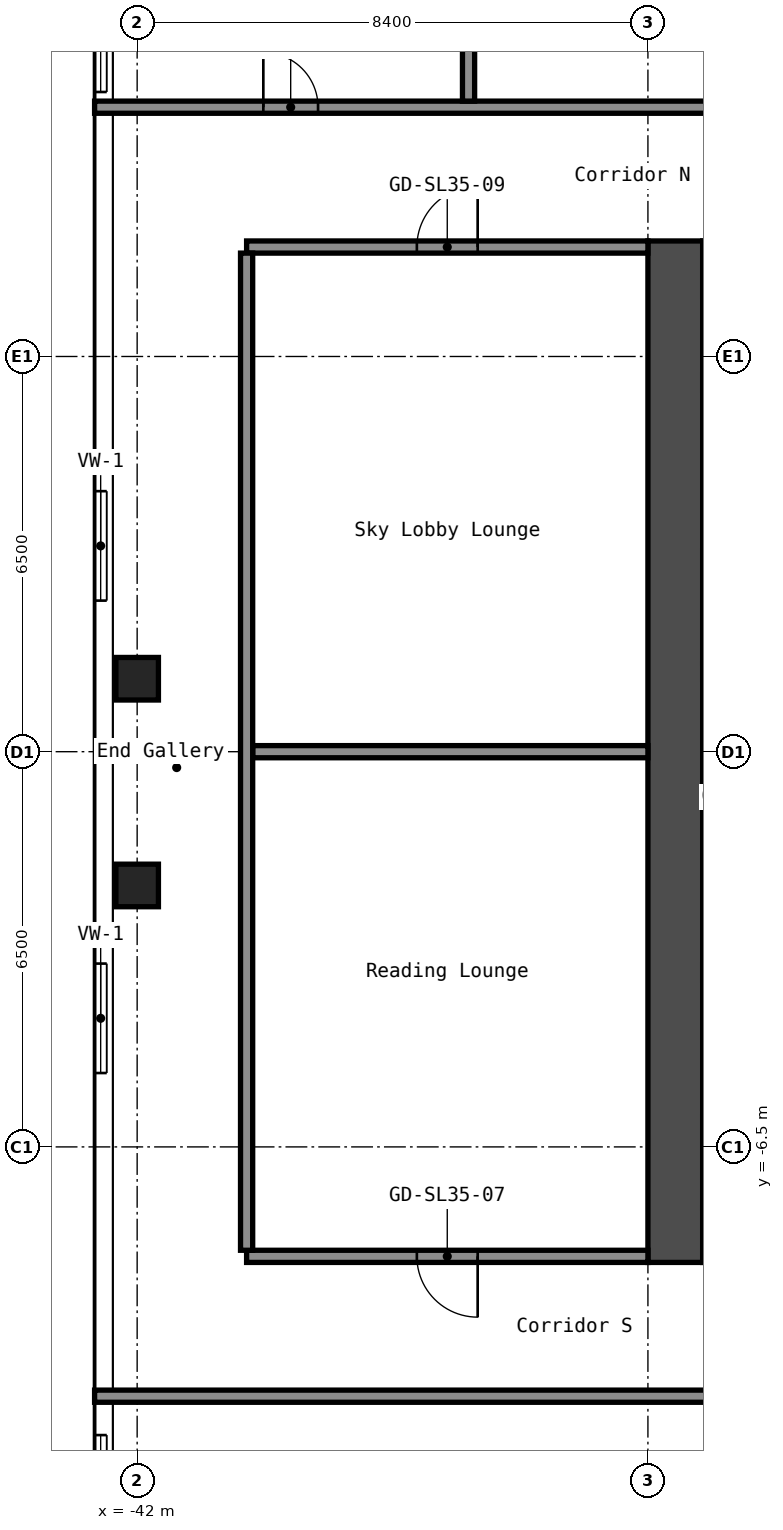
"""IFC4 building model, lengths in metres.
Left out: names, types, materials, properties, quantities, classifications, styles, units other than length and angle.
Written with IfcOpenShell. Run it as: python <this file> out.ifc"""

import sys

from ifc_helpers import new_model, si_unit, direction, frame, frame_2d, origin, origin_2d, place, context, subcontext, project, spatial, rectangle, hollow_rectangle, extrude, element, fill, save


model = new_model("IFC4")
c1 = context("Model", 3, precision=1e-05, world=origin(), true_north=direction((0.0, 1.0)))
c2 = subcontext(c1, "Body", "Model", "MODEL_VIEW")
j1 = project(units=[si_unit("LENGTHUNIT", "METRE"), si_unit("PLANEANGLEUNIT", "RADIAN")], contexts=[c1])
p1 = place(None, origin())
s1 = spatial("IfcSite", under=j1, at=p1, CompositionType="ELEMENT")
p2 = place(p1, origin())
s2 = spatial("IfcBuilding", under=s1, at=p2, CompositionType="ELEMENT")
p3 = place(p2, frame((0.0, 0.0, 124.6)))
s3 = spatial("IfcBuildingStorey", under=s2, at=p3, CompositionType="ELEMENT", Elevation=124.6)
for number, where, z_axis, x_axis in (
    (1, (-42.0, -2.2, 0.0), (0.0, 0.0, 1.0), (1.0, 0.0, 0.0)),
    (2, (-42.0, 1.2, 0.0), (0.0, 0.0, 1.0), (1.0, 0.0, 0.0)),
):
    element("IfcColumn", number, at=place(p3, frame(where, z_axis=z_axis, x_axis=x_axis)), inside=s3, PredefinedType="COLUMN", context=c2, shape_type="SweptSolid", body=[
        extrude(hollow_rectangle(XDim=0.7, YDim=0.7, WallThickness=0.028, at=origin_2d()), origin(), (0.0, 0.0, 1.0), 5.95),
    ])
p4 = place(p3, frame((-33.15, -8.4, 0.0), z_axis=(0.0, 0.0, 1.0), x_axis=(0.0, 1.0, 0.0)))
e3 = element("IfcWall", 3, at=p4, inside=s3, PredefinedType="SHEAR", context=c2, shape_type="SweptSolid", body=[
    extrude(rectangle(XDim=16.8, YDim=0.9, at=frame_2d((8.4, 0.0))), origin(), (0.0, 0.0, 1.0), 5.95),
])
p5 = place(p3, frame((-32.7, 1.325, 0.0), z_axis=(0.0, 0.0, 1.0), x_axis=(1.0, 0.0, 0.0)))
e4 = element("IfcWall", 4, at=p5, inside=s3, PredefinedType="SHEAR", context=c2, shape_type="SweptSolid", body=[
    extrude(rectangle(XDim=5.05, YDim=0.25, at=frame_2d((2.525, 0.0))), origin(), (0.0, 0.0, 1.0), 5.95),
])
p6 = place(p5, frame((3.3, 0.0, 0.0)))
e5 = element("IfcOpeningElement", 5, at=p6, cuts=e4, PredefinedType="OPENING", context=c2, shape_type="SweptSolid", body=[
    extrude(rectangle(XDim=1.2, YDim=2.1, at=frame_2d((0.6, 1.05))), frame((0.0, 0.135, 0.0), z_axis=(0.0, -1.0, 0.0), x_axis=(1.0, 0.0, 0.0)), (0.0, 0.0, 1.0), 0.27),
])
p7 = place(p3, frame((-32.7, -3.625, 0.0), z_axis=(0.0, 0.0, 1.0), x_axis=(1.0, 0.0, 0.0)))
e6 = element("IfcWall", 6, at=p7, inside=s3, PredefinedType="SHEAR", context=c2, shape_type="SweptSolid", body=[
    extrude(rectangle(XDim=4.55, YDim=0.25, at=frame_2d((2.275, 0.0))), origin(), (0.0, 0.0, 1.0), 5.95),
])
p8 = place(p7, frame((2.85, 0.0, 0.0)))
e7 = element("IfcOpeningElement", 7, at=p8, cuts=e6, PredefinedType="OPENING", context=c2, shape_type="SweptSolid", body=[
    extrude(rectangle(XDim=1.1, YDim=2.1, at=frame_2d((0.55, 1.05))), frame((0.0, 0.135, 0.0), z_axis=(0.0, -1.0, 0.0), x_axis=(1.0, 0.0, 0.0)), (0.0, 0.0, 1.0), 0.27),
])
p9 = place(p7, frame((0.6, 0.0, 0.0)))
e8 = element("IfcOpeningElement", 8, at=p9, cuts=e6, PredefinedType="OPENING", context=c2, shape_type="SweptSolid", body=[
    extrude(rectangle(XDim=1.1, YDim=2.1, at=frame_2d((0.55, 1.05))), frame((0.0, 0.135, 0.0), z_axis=(0.0, -1.0, 0.0), x_axis=(1.0, 0.0, 0.0)), (0.0, 0.0, 1.0), 0.27),
])
p10 = place(p3, frame((-32.7, -6.75, 0.0), z_axis=(0.0, 0.0, 1.0), x_axis=(1.0, 0.0, 0.0)))
e9 = element("IfcWall", 9, at=p10, inside=s3, PredefinedType="SHEAR", context=c2, shape_type="SweptSolid", body=[
    extrude(rectangle(XDim=4.55, YDim=1.5, at=frame_2d((2.275, 0.0))), origin(), (0.0, 0.0, 1.0), 5.95),
])
p11 = place(p3, frame((-42.7, -10.6, 0.0), z_axis=(0.0, 0.0, 1.0), x_axis=(1.0, 0.0, 0.0)))
e10 = element("IfcWall", 10, at=p11, inside=s3, PredefinedType="PARTITIONING", context=c2, shape_type="SweptSolid", body=[
    extrude(rectangle(XDim=25.9, YDim=0.2, at=frame_2d((12.95, 0.0))), origin(), (0.0, 0.0, 1.0), 5.95),
])
p12 = place(p11, frame((10.2, 0.0, 0.0)))
e11 = element("IfcOpeningElement", 11, at=p12, cuts=e10, PredefinedType="OPENING", context=c2, shape_type="SweptSolid", body=[
    extrude(rectangle(XDim=1.6, YDim=2.1, at=frame_2d((0.8, 1.05))), frame((0.0, 0.11, 0.0), z_axis=(0.0, -1.0, 0.0), x_axis=(1.0, 0.0, 0.0)), (0.0, 0.0, 1.0), 0.22),
])
p13 = place(p11, frame((20.9, 0.0, 0.0)))
e12 = element("IfcOpeningElement", 12, at=p13, cuts=e10, PredefinedType="OPENING", context=c2, shape_type="SweptSolid", body=[
    extrude(rectangle(XDim=1.6, YDim=2.1, at=frame_2d((0.8, 1.05))), frame((0.0, 0.11, 0.0), z_axis=(0.0, -1.0, 0.0), x_axis=(1.0, 0.0, 0.0)), (0.0, 0.0, 1.0), 0.22),
])
p14 = place(p3, frame((-40.2, -8.3, 0.0), z_axis=(0.0, 0.0, 1.0), x_axis=(1.0, 0.0, 0.0)))
e13 = element("IfcWall", 13, at=p14, inside=s3, PredefinedType="PARTITIONING", context=c2, shape_type="SweptSolid", body=[
    extrude(rectangle(XDim=6.6, YDim=0.2, at=frame_2d((3.3, 0.0))), origin(), (0.0, 0.0, 1.0), 5.95),
])
p15 = place(p14, frame((2.8, 0.0, 0.0)))
e14 = element("IfcOpeningElement", 14, at=p15, cuts=e13, PredefinedType="OPENING", context=c2, shape_type="SweptSolid", body=[
    extrude(rectangle(XDim=1.0, YDim=2.1, at=frame_2d((0.5, 1.05))), frame((0.0, 0.11, 0.0), z_axis=(0.0, -1.0, 0.0), x_axis=(1.0, 0.0, 0.0)), (0.0, 0.0, 1.0), 0.22),
])
p16 = place(p3, frame((-40.1, 0.0, 0.0), z_axis=(0.0, 0.0, 1.0), x_axis=(1.0, 0.0, 0.0)))
e15 = element("IfcWall", 15, at=p16, inside=s3, PredefinedType="PARTITIONING", context=c2, shape_type="SweptSolid", body=[
    extrude(rectangle(XDim=6.5, YDim=0.2, at=frame_2d((3.25, 0.0))), origin(), (0.0, 0.0, 1.0), 5.95),
])
p17 = place(p3, frame((-40.2, 8.3, 0.0), z_axis=(0.0, 0.0, 1.0), x_axis=(1.0, 0.0, 0.0)))
e16 = element("IfcWall", 16, at=p17, inside=s3, PredefinedType="PARTITIONING", context=c2, shape_type="SweptSolid", body=[
    extrude(rectangle(XDim=6.6, YDim=0.2, at=frame_2d((3.3, 0.0))), origin(), (0.0, 0.0, 1.0), 5.95),
])
p18 = place(p17, frame((2.8, 0.0, 0.0)))
e17 = element("IfcOpeningElement", 17, at=p18, cuts=e16, PredefinedType="OPENING", context=c2, shape_type="SweptSolid", body=[
    extrude(rectangle(XDim=1.0, YDim=2.1, at=frame_2d((0.5, 1.05))), frame((0.0, 0.11, 0.0), z_axis=(0.0, -1.0, 0.0), x_axis=(1.0, 0.0, 0.0)), (0.0, 0.0, 1.0), 0.22),
])
p19 = place(p3, frame((-42.7, 10.6, 0.0), z_axis=(0.0, 0.0, 1.0), x_axis=(1.0, 0.0, 0.0)))
e18 = element("IfcWall", 18, at=p19, inside=s3, PredefinedType="PARTITIONING", context=c2, shape_type="SweptSolid", body=[
    extrude(rectangle(XDim=25.9, YDim=0.2, at=frame_2d((12.95, 0.0))), origin(), (0.0, 0.0, 1.0), 5.95),
])
p20 = place(p19, frame((2.775, 0.0, 0.0)))
e19 = element("IfcOpeningElement", 19, at=p20, cuts=e18, PredefinedType="OPENING", context=c2, shape_type="SweptSolid", body=[
    extrude(rectangle(XDim=0.9, YDim=2.1, at=frame_2d((0.45, 1.05))), frame((0.0, 0.11, 0.0), z_axis=(0.0, -1.0, 0.0), x_axis=(1.0, 0.0, 0.0)), (0.0, 0.0, 1.0), 0.22),
])
p21 = place(p19, frame((10.725, 0.0, 0.0)))
e20 = element("IfcOpeningElement", 20, at=p21, cuts=e18, PredefinedType="OPENING", context=c2, shape_type="SweptSolid", body=[
    extrude(rectangle(XDim=0.9, YDim=2.1, at=frame_2d((0.45, 1.05))), frame((0.0, 0.11, 0.0), z_axis=(0.0, -1.0, 0.0), x_axis=(1.0, 0.0, 0.0)), (0.0, 0.0, 1.0), 0.22),
])
p22 = place(p19, frame((14.3, 0.0, 0.0)))
e21 = element("IfcOpeningElement", 21, at=p22, cuts=e18, PredefinedType="OPENING", context=c2, shape_type="SweptSolid", body=[
    extrude(rectangle(XDim=0.9, YDim=2.1, at=frame_2d((0.45, 1.05))), frame((0.0, 0.11, 0.0), z_axis=(0.0, -1.0, 0.0), x_axis=(1.0, 0.0, 0.0)), (0.0, 0.0, 1.0), 0.22),
])
p23 = place(p19, frame((20.9, 0.0, 0.0)))
e22 = element("IfcOpeningElement", 22, at=p23, cuts=e18, PredefinedType="OPENING", context=c2, shape_type="SweptSolid", body=[
    extrude(rectangle(XDim=1.6, YDim=2.1, at=frame_2d((0.8, 1.05))), frame((0.0, 0.11, 0.0), z_axis=(0.0, -1.0, 0.0), x_axis=(1.0, 0.0, 0.0)), (0.0, 0.0, 1.0), 0.22),
])
p24 = place(p3, frame((-40.2, -8.2, 0.0), z_axis=(0.0, 0.0, 1.0), x_axis=(0.0, 1.0, 0.0)))
e23 = element("IfcWall", 23, at=p24, inside=s3, PredefinedType="PARTITIONING", context=c2, shape_type="SweptSolid", body=[
    extrude(rectangle(XDim=16.4, YDim=0.2, at=frame_2d((8.2, 0.0))), origin(), (0.0, 0.0, 1.0), 5.95),
])
p25 = place(p3, frame((-36.55, 10.7, 0.0), z_axis=(0.0, 0.0, 1.0), x_axis=(0.0, 1.0, 0.0)))
e24 = element("IfcWall", 24, at=p25, inside=s3, PredefinedType="PARTITIONING", context=c2, shape_type="SweptSolid", body=[
    extrude(rectangle(XDim=7.6, YDim=0.2, at=frame_2d((3.8, 0.0))), origin(), (0.0, 0.0, 1.0), 5.95),
])
p26 = place(p3, frame((-42.6, 15.01, 4.45), z_axis=(0.0, 0.0, 1.0), x_axis=(0.0, -1.0, 0.0)))
p27 = place(p26, frame((2.359, 0.0, 0.25)))
p28 = place(p27, origin())
e25 = element("IfcWindow", 25, at=p28, inside=s3, PartitioningType="SINGLE_PANEL", PredefinedType="WINDOW", context=c2, shape_type="SweptSolid", body=[
    extrude(rectangle(XDim=1.8, YDim=0.9, at=frame_2d((0.9, 0.45))), frame((0.0, 0.03, 0.0), z_axis=(0.0, -1.0, 0.0), x_axis=(1.0, 0.0, 0.0)), (0.0, 0.0, 1.0), 0.06),
])
p29 = place(p3, frame((-42.6, 7.27, 4.45), z_axis=(0.0, 0.0, 1.0), x_axis=(0.0, -1.0, 0.0)))
p30 = place(p29, frame((2.985, 0.0, 0.25)))
p31 = place(p30, origin())
e26 = element("IfcWindow", 26, at=p31, inside=s3, PartitioningType="SINGLE_PANEL", PredefinedType="WINDOW", context=c2, shape_type="SweptSolid", body=[
    extrude(rectangle(XDim=1.8, YDim=0.9, at=frame_2d((0.9, 0.45))), frame((0.0, 0.03, 0.0), z_axis=(0.0, -1.0, 0.0), x_axis=(1.0, 0.0, 0.0)), (0.0, 0.0, 1.0), 0.06),
])
p32 = place(p3, frame((-42.6, -0.5, 4.45), z_axis=(0.0, 0.0, 1.0), x_axis=(0.0, -1.0, 0.0)))
p33 = place(p32, frame((2.985, 0.0, 0.25)))
p34 = place(p33, origin())
e27 = element("IfcWindow", 27, at=p34, inside=s3, PartitioningType="SINGLE_PANEL", PredefinedType="WINDOW", context=c2, shape_type="SweptSolid", body=[
    extrude(rectangle(XDim=1.8, YDim=0.9, at=frame_2d((0.9, 0.45))), frame((0.0, 0.03, 0.0), z_axis=(0.0, -1.0, 0.0), x_axis=(1.0, 0.0, 0.0)), (0.0, 0.0, 1.0), 0.06),
])
p35 = place(p3, frame((-42.6, -8.27, 4.45), z_axis=(0.0, 0.0, 1.0), x_axis=(0.0, -1.0, 0.0)))
p36 = place(p35, frame((2.97, 0.0, 0.25)))
p37 = place(p36, origin())
e28 = element("IfcWindow", 28, at=p37, inside=s3, PartitioningType="SINGLE_PANEL", PredefinedType="WINDOW", context=c2, shape_type="SweptSolid", body=[
    extrude(rectangle(XDim=1.8, YDim=0.9, at=frame_2d((0.9, 0.45))), frame((0.0, 0.03, 0.0), z_axis=(0.0, -1.0, 0.0), x_axis=(1.0, 0.0, 0.0)), (0.0, 0.0, 1.0), 0.06),
])
p38 = place(p15, origin())
e29 = element("IfcDoor", 29, at=p38, inside=s3, OperationType="SINGLE_SWING_RIGHT", PredefinedType="DOOR", context=c2, shape_type="SweptSolid", body=[
    extrude(rectangle(XDim=1.0, YDim=2.1, at=frame_2d((0.5, 1.05))), frame((0.0, 0.025, 0.0), z_axis=(0.0, -1.0, 0.0), x_axis=(1.0, 0.0, 0.0)), (0.0, 0.0, 1.0), 0.05),
])
fill(e14, e29)
p39 = place(p18, origin())
e30 = element("IfcDoor", 30, at=p39, inside=s3, OperationType="SINGLE_SWING_LEFT", PredefinedType="DOOR", context=c2, shape_type="SweptSolid", body=[
    extrude(rectangle(XDim=1.0, YDim=2.1, at=frame_2d((0.5, 1.05))), frame((0.0, 0.025, 0.0), z_axis=(0.0, -1.0, 0.0), x_axis=(1.0, 0.0, 0.0)), (0.0, 0.0, 1.0), 0.05),
])
fill(e17, e30)
p40 = place(p20, origin())
e31 = element("IfcDoor", 31, at=p40, inside=s3, OperationType="SINGLE_SWING_RIGHT", PredefinedType="DOOR", context=c2, shape_type="SweptSolid", body=[
    extrude(rectangle(XDim=0.9, YDim=2.1, at=frame_2d((0.45, 1.05))), frame((0.0, 0.025, 0.0), z_axis=(0.0, -1.0, 0.0), x_axis=(1.0, 0.0, 0.0)), (0.0, 0.0, 1.0), 0.05),
])
fill(e19, e31)
save(model, sys.argv[1])
